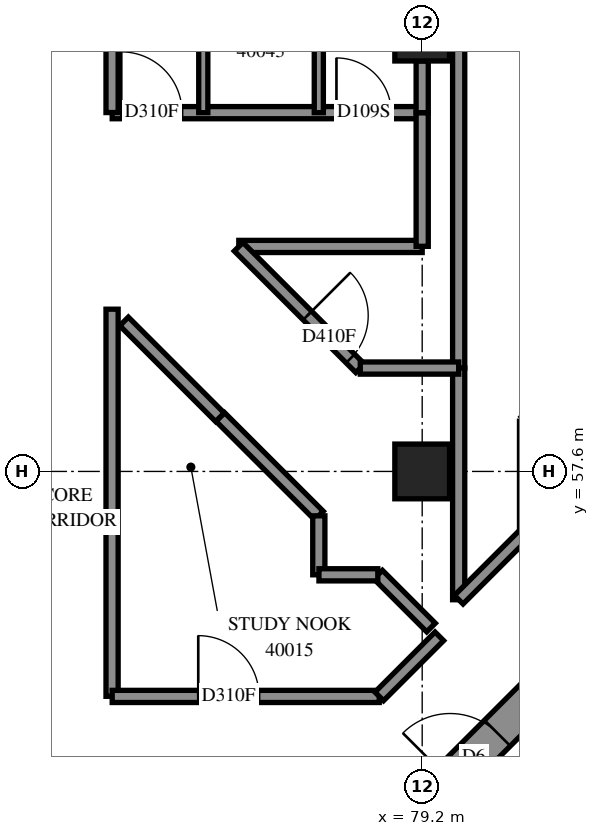
"""IFC4 building model, lengths in metres.
Left out: names, types, materials, properties, quantities, classifications, styles, units other than length and angle.
Written with IfcOpenShell. Run it as: python <this file> out.ifc"""

import sys

from ifc_helpers import new_model, si_unit, direction, frame, frame_2d, origin, origin_2d, place, context, subcontext, project, spatial, rectangle, extrude, element, fill, save


model = new_model("IFC4")
c1 = context("Model", 3, precision=1e-05, world=origin(), true_north=direction((0.0, 1.0)))
c2 = subcontext(c1, "Body", "Model", "MODEL_VIEW")
j1 = project(units=[si_unit("LENGTHUNIT", "METRE"), si_unit("PLANEANGLEUNIT", "RADIAN")], contexts=[c1])
p1 = place(None, origin())
s1 = spatial("IfcSite", under=j1, at=p1, CompositionType="ELEMENT")
p2 = place(p1, origin())
s2 = spatial("IfcBuilding", under=s1, at=p2, CompositionType="ELEMENT")
p3 = place(p2, frame((0.0, 0.0, 149.0)))
s3 = spatial("IfcBuildingStorey", under=s2, at=p3, CompositionType="ELEMENT", Elevation=149.0)
for number, where, z_axis, x_axis in (
    (1, (79.2, 57.6, 0.0), (0.0, 0.0, 1.0), (1.0, 0.0, 0.0)),
    (2, (79.2, 64.8, 0.0), (0.0, 0.0, 1.0), (1.0, 0.0, 0.0)),
):
    element("IfcColumn", number, at=place(p3, frame(where, z_axis=z_axis, x_axis=x_axis)), inside=s3, PredefinedType="COLUMN", context=c2, shape_type="SweptSolid", body=[
        extrude(rectangle(XDim=0.9, YDim=0.9, at=origin_2d()), origin(), (0.0, 0.0, 1.0), 3.1),
    ])
p4 = place(p3, frame((76.442, 49.302, -0.3), z_axis=(0.0, 0.0, 1.0), x_axis=(0.7071067812, 0.7071067812, 0.0)))
e3 = element("IfcWall", 3, at=p4, inside=s3, PredefinedType="SHEAR", context=c2, shape_type="SweptSolid", body=[
    extrude(rectangle(XDim=14.4, YDim=0.6, at=frame_2d((7.2, 0.0))), origin(), (0.0, 0.0, 1.0), 2.7),
])
p5 = place(p4, frame((4.55, 0.0, 0.3)))
e4 = element("IfcOpeningElement", 4, at=p5, cuts=e3, PredefinedType="OPENING", context=c2, shape_type="SweptSolid", body=[
    extrude(rectangle(XDim=1.1, YDim=2.1, at=frame_2d((0.55, 1.05))), frame((0.0, 0.31, 0.0), z_axis=(0.0, -1.0, 0.0), x_axis=(1.0, 0.0, 0.0)), (0.0, 0.0, 1.0), 0.62),
])
p6 = place(p4, frame((11.35, 0.0, 0.3)))
e5 = element("IfcOpeningElement", 5, at=p6, cuts=e3, PredefinedType="OPENING", context=c2, shape_type="SweptSolid", body=[
    extrude(rectangle(XDim=1.1, YDim=2.1, at=frame_2d((0.55, 1.05))), frame((0.0, 0.31, 0.0), z_axis=(0.0, -1.0, 0.0), x_axis=(1.0, 0.0, 0.0)), (0.0, 0.0, 1.0), 0.62),
])
p7 = place(p3, frame((79.8, 59.3, 0.0), z_axis=(0.0, 0.0, 1.0), x_axis=(0.0, 1.0, 0.0)))
e6 = element("IfcWall", 6, at=p7, inside=s3, PredefinedType="PARTITIONING", context=c2, shape_type="SweptSolid", body=[
    extrude(rectangle(XDim=14.317, YDim=0.2, at=frame_2d((7.159, 0.0))), origin(), (0.0, 0.0, 1.0), 3.1),
])
p8 = place(p3, frame((74.1, 53.902, 0.0), z_axis=(0.0, 0.0, 1.0), x_axis=(0.0, 1.0, 0.0)))
e7 = element("IfcWall", 7, at=p8, inside=s3, PredefinedType="PARTITIONING", context=c2, shape_type="SweptSolid", body=[
    extrude(rectangle(XDim=6.366, YDim=0.2, at=frame_2d((3.183, 0.0))), origin(), (0.0, 0.0, 1.0), 3.1),
])
p9 = place(p3, frame((74.102, 63.5, 0.0), z_axis=(0.0, 0.0, 1.0), x_axis=(1.0, 0.0, 0.0)))
e8 = element("IfcWall", 8, at=p9, inside=s3, PredefinedType="PARTITIONING", context=c2, shape_type="SweptSolid", body=[
    extrude(rectangle(XDim=5.098, YDim=0.2, at=frame_2d((2.549, 0.0))), origin(), (0.0, 0.0, 1.0), 3.1),
])
p10 = place(p9, frame((0.149, 0.0, 0.0)))
e9 = element("IfcOpeningElement", 9, at=p10, cuts=e8, PredefinedType="OPENING", context=c2, shape_type="SweptSolid", body=[
    extrude(rectangle(XDim=1.0, YDim=2.1, at=frame_2d((0.5, 1.05))), frame((0.0, 0.11, 0.0), z_axis=(0.0, -1.0, 0.0), x_axis=(1.0, 0.0, 0.0)), (0.0, 0.0, 1.0), 0.22),
])
p11 = place(p9, frame((3.688, 0.0, 0.0)))
e10 = element("IfcOpeningElement", 10, at=p11, cuts=e8, PredefinedType="OPENING", context=c2, shape_type="SweptSolid", body=[
    extrude(rectangle(XDim=0.9, YDim=2.1, at=frame_2d((0.45, 1.05))), frame((0.0, 0.11, 0.0), z_axis=(0.0, -1.0, 0.0), x_axis=(1.0, 0.0, 0.0)), (0.0, 0.0, 1.0), 0.22),
])
p12 = place(p3, frame((74.102, 53.9, 0.0), z_axis=(0.0, 0.0, 1.0), x_axis=(1.0, 0.0, 0.0)))
e11 = element("IfcWall", 11, at=p12, inside=s3, PredefinedType="PARTITIONING", context=c2, shape_type="SweptSolid", body=[
    extrude(rectangle(XDim=4.392, YDim=0.2, at=frame_2d((2.196, 0.0))), origin(), (0.0, 0.0, 1.0), 3.1),
])
p13 = place(p12, frame((1.415, 0.0, 0.0)))
e12 = element("IfcOpeningElement", 12, at=p13, cuts=e11, PredefinedType="OPENING", context=c2, shape_type="SweptSolid", body=[
    extrude(rectangle(XDim=1.0, YDim=2.1, at=frame_2d((0.5, 1.05))), frame((0.0, 0.11, 0.0), z_axis=(0.0, -1.0, 0.0), x_axis=(1.0, 0.0, 0.0)), (0.0, 0.0, 1.0), 0.22),
])
p14 = place(p3, frame((79.8, 55.49, 0.0), z_axis=(0.0, 0.0, 1.0), x_axis=(0.0, 1.0, 0.0)))
e13 = element("IfcWall", 13, at=p14, inside=s3, PredefinedType="PARTITIONING", context=c2, shape_type="SweptSolid", body=[
    extrude(rectangle(XDim=3.81, YDim=0.2, at=frame_2d((1.905, 0.0))), origin(), (0.0, 0.0, 1.0), 3.1),
])
p15 = place(p3, frame((74.1, 63.502, 0.0), z_axis=(0.0, 0.0, 1.0), x_axis=(0.0, 1.0, 0.0)))
e14 = element("IfcWall", 14, at=p15, inside=s3, PredefinedType="PARTITIONING", context=c2, shape_type="SweptSolid", body=[
    extrude(rectangle(XDim=3.398, YDim=0.2, at=frame_2d((1.699, 0.0))), origin(), (0.0, 0.0, 1.0), 3.1),
])
p16 = place(p3, frame((76.184, 61.3, 0.0), z_axis=(0.0, 0.0, 1.0), x_axis=(1.0, 0.0, 0.0)))
e15 = element("IfcWall", 15, at=p16, inside=s3, PredefinedType="PARTITIONING", context=c2, shape_type="SweptSolid", body=[
    extrude(rectangle(XDim=3.016, YDim=0.2, at=frame_2d((1.508, 0.0))), origin(), (0.0, 0.0, 1.0), 3.1),
])
p17 = place(p3, frame((76.181, 61.295, 0.0), z_axis=(0.0, 0.0, 1.0), x_axis=(0.7071067812, -0.7071067812, 0.0)))
e16 = element("IfcWall", 16, at=p17, inside=s3, PredefinedType="PARTITIONING", context=c2, shape_type="SweptSolid", body=[
    extrude(rectangle(XDim=2.826, YDim=0.2, at=frame_2d((1.413, 0.0))), origin(), (0.0, 0.0, 1.0), 3.1),
])
p18 = place(p17, frame((1.6, 0.0, 0.0)))
e17 = element("IfcOpeningElement", 17, at=p18, cuts=e16, PredefinedType="OPENING", context=c2, shape_type="SweptSolid", body=[
    extrude(rectangle(XDim=1.0, YDim=2.1, at=frame_2d((0.5, 1.05))), frame((0.0, 0.11, 0.0), z_axis=(0.0, -1.0, 0.0), x_axis=(1.0, 0.0, 0.0)), (0.0, 0.0, 1.0), 0.22),
])
for number, where, z_axis, x_axis in (
    (18, (75.6, 63.5, 0.0), (0.0, 0.0, 1.0), (0.0, 1.0, 0.0)),
    (19, (77.5, 63.5, 0.0), (0.0, 0.0, 1.0), (0.0, 1.0, 0.0)),
):
    element("IfcWall", number, at=place(p3, frame(where, z_axis=z_axis, x_axis=x_axis)), inside=s3, PredefinedType="PARTITIONING", context=c2, shape_type="SweptSolid", body=[
        extrude(rectangle(XDim=2.4, YDim=0.15, at=frame_2d((1.2, 0.0))), origin(), (0.0, 0.0, 1.0), 3.1),
    ])
p19 = place(p3, frame((75.879, 58.497, 0.0), z_axis=(0.0, 0.0, 1.0), x_axis=(0.7075423257, -0.7066709682, 0.0)))
e20 = element("IfcWall", 20, at=p19, inside=s3, PredefinedType="PARTITIONING", context=c2, shape_type="SweptSolid", body=[
    extrude(rectangle(XDim=2.295, YDim=0.2, at=frame_2d((1.148, 0.0))), origin(), (0.0, 0.0, 1.0), 3.1),
])
p20 = place(p3, frame((74.297, 60.067, 0.0), z_axis=(0.0, 0.0, 1.0), x_axis=(0.7071067812, -0.7071067812, 0.0)))
e21 = element("IfcWall", 21, at=p20, inside=s3, PredefinedType="PARTITIONING", context=c2, shape_type="SweptSolid", body=[
    extrude(rectangle(XDim=2.229, YDim=0.2, at=frame_2d((1.114, 0.0))), origin(), (0.0, 0.0, 1.0), 3.1),
])
p21 = place(p3, frame((79.2, 61.302, 0.0), z_axis=(0.0, 0.0, 1.0), x_axis=(0.0, 1.0, 0.0)))
e22 = element("IfcWall", 22, at=p21, inside=s3, PredefinedType="PARTITIONING", context=c2, shape_type="SweptSolid", body=[
    extrude(rectangle(XDim=2.198, YDim=0.2, at=frame_2d((1.099, 0.0))), origin(), (0.0, 0.0, 1.0), 3.1),
])
p22 = place(p3, frame((78.182, 59.3, 0.0), z_axis=(0.0, 0.0, 1.0), x_axis=(1.0, 0.0, 0.0)))
e23 = element("IfcWall", 23, at=p22, inside=s3, PredefinedType="PARTITIONING", context=c2, shape_type="SweptSolid", body=[
    extrude(rectangle(XDim=1.618, YDim=0.2, at=frame_2d((0.809, 0.0))), origin(), (0.0, 0.0, 1.0), 3.1),
])
p23 = place(p3, frame((79.801, 55.491, 0.0), z_axis=(0.0, 0.0, 1.0), x_axis=(0.7071067812, 0.7071067812, 0.0)))
e24 = element("IfcWall", 24, at=p23, inside=s3, PredefinedType="PARTITIONING", context=c2, shape_type="SweptSolid", body=[
    extrude(rectangle(XDim=1.553, YDim=0.2, at=frame_2d((0.776, 0.0))), origin(), (0.0, 0.0, 1.0), 3.1),
])
p24 = place(p3, frame((78.494, 53.9, 0.0), z_axis=(0.0, 0.0, 1.0), x_axis=(0.7071067812, 0.7071067812, 0.0)))
e25 = element("IfcWall", 25, at=p24, inside=s3, PredefinedType="PARTITIONING", context=c2, shape_type="SweptSolid", body=[
    extrude(rectangle(XDim=1.397, YDim=0.2, at=frame_2d((0.699, 0.0))), origin(), (0.0, 0.0, 1.0), 3.1),
])
p25 = place(p3, frame((78.475, 55.903, 0.0), z_axis=(0.0, 0.0, 1.0), x_axis=(0.7071067812, -0.7071067812, 0.0)))
e26 = element("IfcWall", 26, at=p25, inside=s3, PredefinedType="PARTITIONING", context=c2, shape_type="SweptSolid", body=[
    extrude(rectangle(XDim=1.23, YDim=0.2, at=frame_2d((0.615, 0.0))), origin(), (0.0, 0.0, 1.0), 3.1),
])
p26 = place(p3, frame((77.5, 55.9, 0.0), z_axis=(0.0, 0.0, 1.0), x_axis=(0.0, 1.0, 0.0)))
e27 = element("IfcWall", 27, at=p26, inside=s3, PredefinedType="PARTITIONING", context=c2, shape_type="SweptSolid", body=[
    extrude(rectangle(XDim=0.97, YDim=0.2, at=frame_2d((0.485, 0.0))), origin(), (0.0, 0.0, 1.0), 3.1),
])
p27 = place(p3, frame((77.502, 55.9, 0.0), z_axis=(0.0, 0.0, 1.0), x_axis=(1.0, 0.0, 0.0)))
e28 = element("IfcWall", 28, at=p27, inside=s3, PredefinedType="PARTITIONING", context=c2, shape_type="SweptSolid", body=[
    extrude(rectangle(XDim=0.968, YDim=0.2, at=frame_2d((0.484, 0.0))), origin(), (0.0, 0.0, 1.0), 3.1),
])
p28 = place(p3, frame((79.2, 63.5, 0.0), z_axis=(0.0, 0.0, 1.0), x_axis=(0.0, 1.0, 0.0)))
e29 = element("IfcWall", 29, at=p28, inside=s3, PredefinedType="PARTITIONING", context=c2, shape_type="SweptSolid", body=[
    extrude(rectangle(XDim=0.85, YDim=0.2, at=frame_2d((0.425, 0.0))), origin(), (0.0, 0.0, 1.0), 3.1),
])
p29 = place(p5, origin())
e30 = element("IfcDoor", 30, at=p29, inside=s3, OperationType="DOUBLE_DOOR_SINGLE_SWING", PredefinedType="DOOR", context=c2, shape_type="SweptSolid", body=[
    extrude(rectangle(XDim=1.1, YDim=2.1, at=frame_2d((0.55, 1.05))), frame((0.0, 0.025, 0.0), z_axis=(0.0, -1.0, 0.0), x_axis=(1.0, 0.0, 0.0)), (0.0, 0.0, 1.0), 0.05),
])
fill(e4, e30)
p30 = place(p13, origin())
e31 = element("IfcDoor", 31, at=p30, inside=s3, OperationType="SINGLE_SWING_LEFT", PredefinedType="DOOR", context=c2, shape_type="SweptSolid", body=[
    extrude(rectangle(XDim=1.0, YDim=2.1, at=frame_2d((0.5, 1.05))), frame((0.0, 0.025, 0.0), z_axis=(0.0, -1.0, 0.0), x_axis=(1.0, 0.0, 0.0)), (0.0, 0.0, 1.0), 0.05),
])
fill(e12, e31)
p31 = place(p10, origin())
e32 = element("IfcDoor", 32, at=p31, inside=s3, OperationType="SINGLE_SWING_RIGHT", PredefinedType="DOOR", context=c2, shape_type="SweptSolid", body=[
    extrude(rectangle(XDim=1.0, YDim=2.1, at=frame_2d((0.5, 1.05))), frame((0.0, 0.025, 0.0), z_axis=(0.0, -1.0, 0.0), x_axis=(1.0, 0.0, 0.0)), (0.0, 0.0, 1.0), 0.05),
])
fill(e9, e32)
p32 = place(p11, origin())
e33 = element("IfcDoor", 33, at=p32, inside=s3, OperationType="SINGLE_SWING_LEFT", PredefinedType="DOOR", context=c2, shape_type="SweptSolid", body=[
    extrude(rectangle(XDim=0.9, YDim=2.1, at=frame_2d((0.45, 1.05))), frame((0.0, 0.025, 0.0), z_axis=(0.0, -1.0, 0.0), x_axis=(1.0, 0.0, 0.0)), (0.0, 0.0, 1.0), 0.05),
])
fill(e10, e33)
p33 = place(p18, origin())
e34 = element("IfcDoor", 34, at=p33, inside=s3, OperationType="SINGLE_SWING_LEFT", PredefinedType="DOOR", context=c2, shape_type="SweptSolid", body=[
    extrude(rectangle(XDim=1.0, YDim=2.1, at=frame_2d((0.5, 1.05))), frame((0.0, 0.025, 0.0), z_axis=(0.0, -1.0, 0.0), x_axis=(1.0, 0.0, 0.0)), (0.0, 0.0, 1.0), 0.05),
])
fill(e17, e34)
save(model, sys.argv[1])
